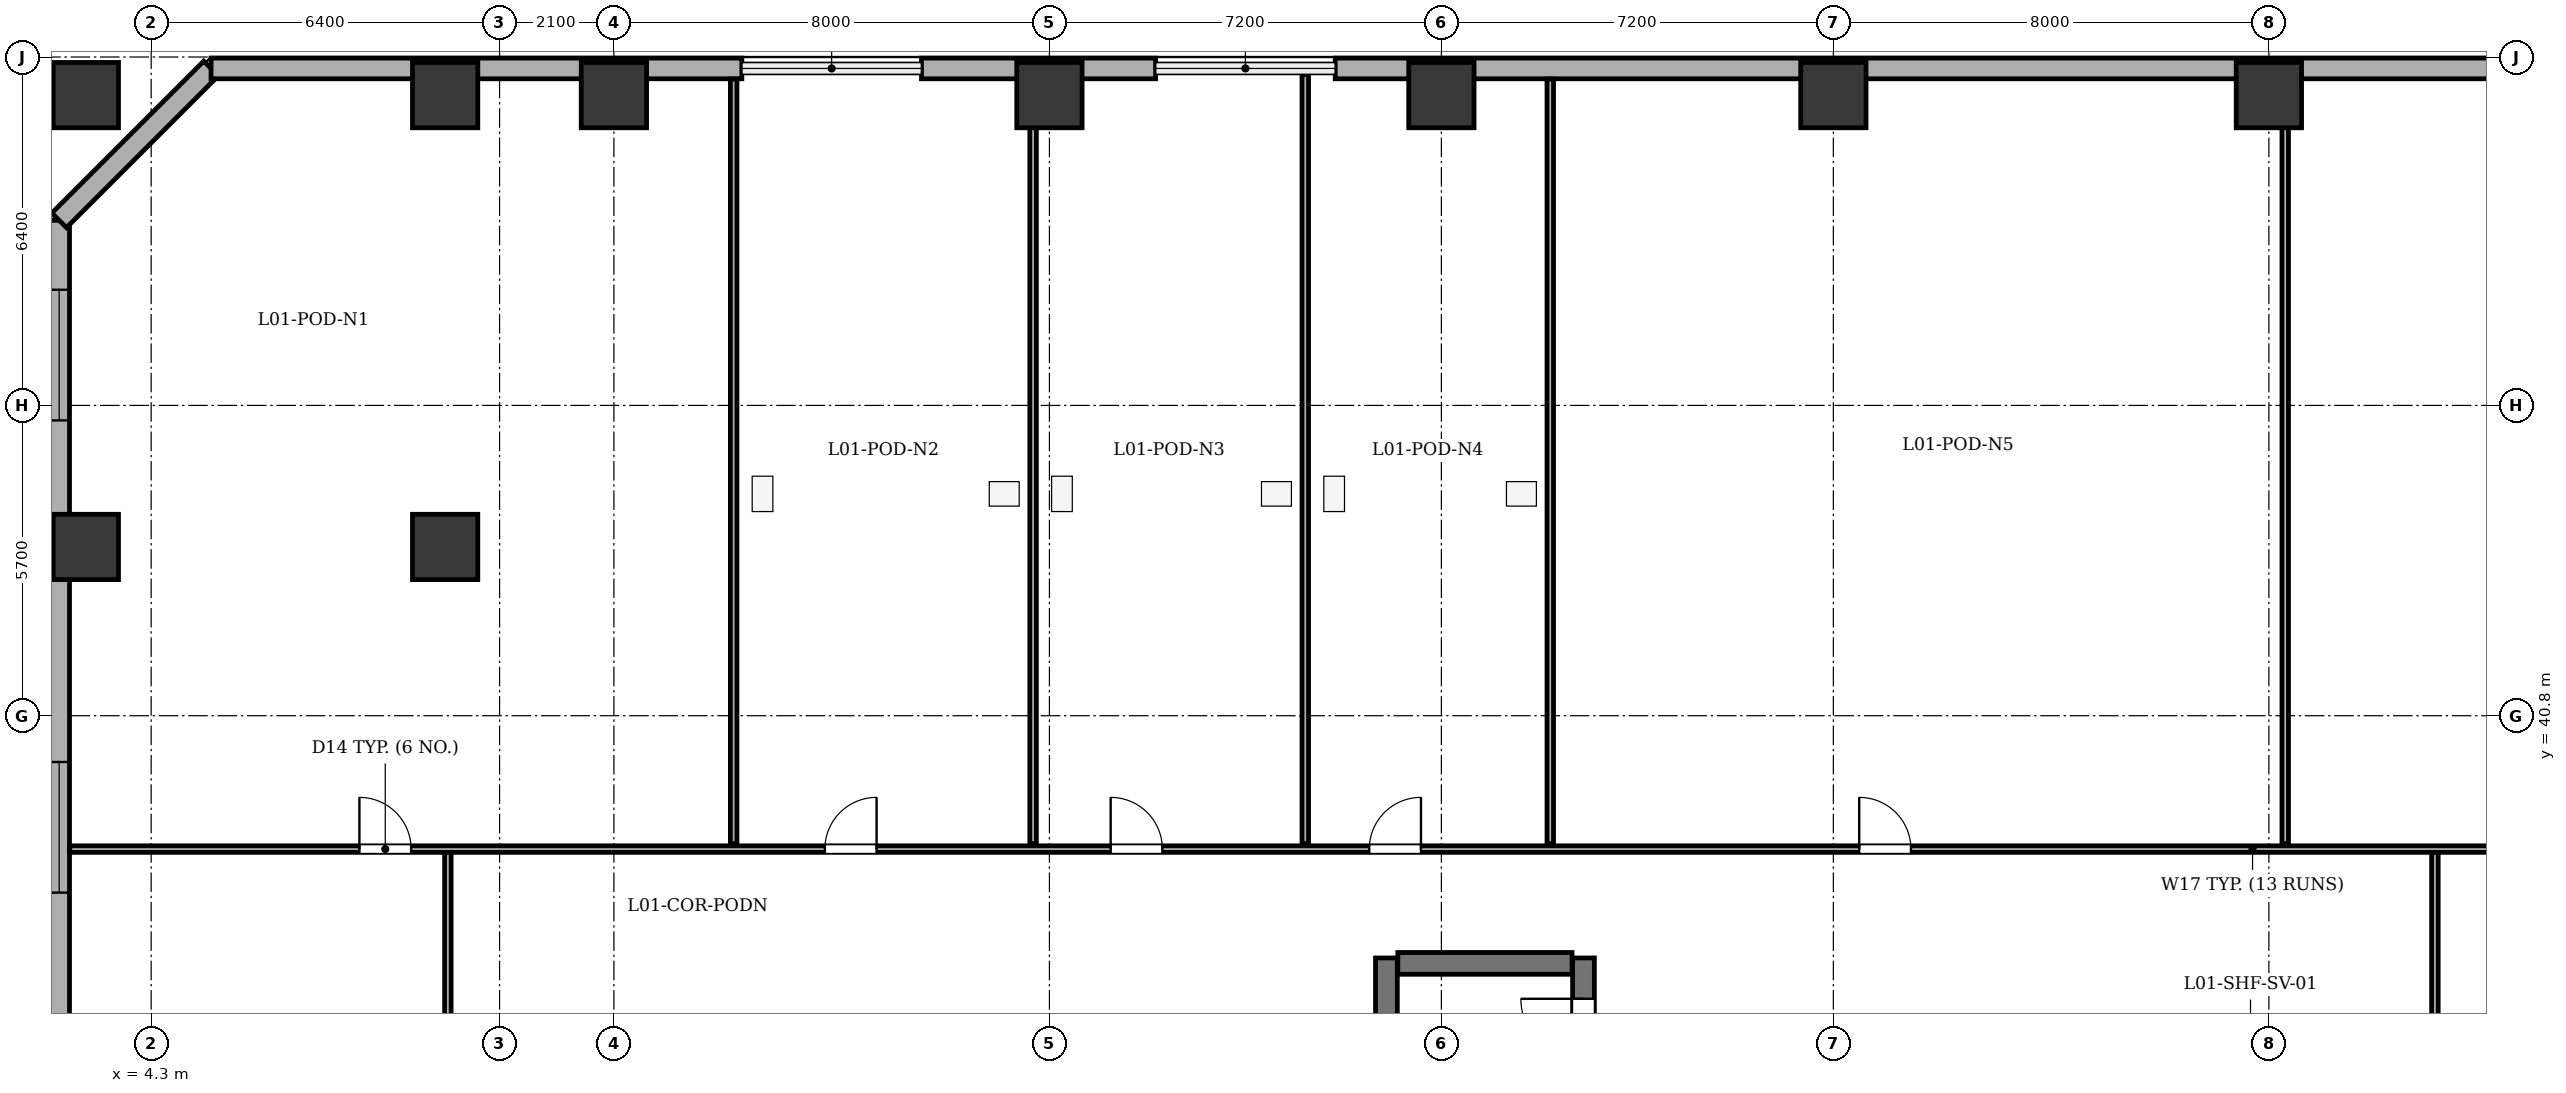
"""IFC4 building model, lengths in metres.
Left out: names, types, materials, properties, quantities, classifications, styles, units other than length and angle.
Written with IfcOpenShell. Run it as: python <this file> out.ifc"""

import sys

from ifc_helpers import new_model, si_unit, direction, frame, frame_2d, origin, origin_2d, place, context, subcontext, project, spatial, rectangle, extrude, element, fill, save


model = new_model("IFC4")
c1 = context("Model", 3, precision=1e-05, world=origin(), true_north=direction((0.0, 1.0)))
c2 = subcontext(c1, "Body", "Model", "MODEL_VIEW")
j1 = project(units=[si_unit("LENGTHUNIT", "METRE"), si_unit("PLANEANGLEUNIT", "RADIAN")], contexts=[c1])
p1 = place(None, origin())
s1 = spatial("IfcSite", under=j1, at=p1, CompositionType="ELEMENT")
p2 = place(p1, origin())
s2 = spatial("IfcBuilding", under=s1, at=p2, CompositionType="ELEMENT")
p3 = place(p2, frame((0.0, 0.0, 5.4)))
s3 = spatial("IfcBuildingStorey", under=s2, at=p3, CompositionType="ELEMENT", Elevation=5.4)
for number, where, z_axis, x_axis in (
    (1, (3.1, 52.2, 0.0), (0.0, 0.0, 1.0), (1.0, 0.0, 0.0)),
    (2, (9.7, 52.2, 0.0), (0.0, 0.0, 1.0), (1.0, 0.0, 0.0)),
    (3, (12.8, 52.2, 0.0), (0.0, 0.0, 1.0), (1.0, 0.0, 0.0)),
    (4, (20.8, 52.2, 0.0), (0.0, 0.0, 1.0), (1.0, 0.0, 0.0)),
    (5, (28.0, 52.2, 0.0), (0.0, 0.0, 1.0), (1.0, 0.0, 0.0)),
    (6, (35.2, 52.2, 0.0), (0.0, 0.0, 1.0), (1.0, 0.0, 0.0)),
    (7, (43.2, 52.2, 0.0), (0.0, 0.0, 1.0), (1.0, 0.0, 0.0)),
    (8, (3.1, 43.9, 0.0), (0.0, 0.0, 1.0), (1.0, 0.0, 0.0)),
    (9, (9.7, 43.9, 0.0), (0.0, 0.0, 1.0), (1.0, 0.0, 0.0)),
):
    element("IfcColumn", number, at=place(p3, frame(where, z_axis=z_axis, x_axis=x_axis)), inside=s3, PredefinedType="COLUMN", context=c2, shape_type="SweptSolid", body=[
        extrude(rectangle(XDim=1.2, YDim=1.2, at=origin_2d()), origin(), (0.0, 0.0, 1.0), 4.5),
    ])
p4 = place(p3, frame((2.61, 4.5, 0.0), z_axis=(0.0, 0.0, 1.0), x_axis=(0.0, 1.0, 0.0)))
e10 = element("IfcWall", 10, at=p4, inside=s3, PredefinedType="STANDARD", context=c2, shape_type="SweptSolid", body=[
    extrude(rectangle(XDim=45.4, YDim=0.38, at=frame_2d((22.7, 0.0))), origin(), (0.0, 0.0, 1.0), 4.18),
])
p5 = place(p4, frame((1.275, 0.0, 0.75)))
e11 = element("IfcOpeningElement", 11, at=p5, cuts=e10, PredefinedType="OPENING", context=c2, shape_type="SweptSolid", body=[
    extrude(rectangle(XDim=2.4, YDim=2.1, at=frame_2d((1.2, 1.05))), frame((0.0, 0.2, 0.0), z_axis=(0.0, -1.0, 0.0), x_axis=(1.0, 0.0, 0.0)), (0.0, 0.0, 1.0), 0.4),
])
p6 = place(p4, frame((9.95, 0.0, 0.75)))
e12 = element("IfcOpeningElement", 12, at=p6, cuts=e10, PredefinedType="OPENING", context=c2, shape_type="SweptSolid", body=[
    extrude(rectangle(XDim=2.4, YDim=2.1, at=frame_2d((1.2, 1.05))), frame((0.0, 0.2, 0.0), z_axis=(0.0, -1.0, 0.0), x_axis=(1.0, 0.0, 0.0)), (0.0, 0.0, 1.0), 0.4),
])
p7 = place(p4, frame((18.3, 0.0, 0.75)))
e13 = element("IfcOpeningElement", 13, at=p7, cuts=e10, PredefinedType="OPENING", context=c2, shape_type="SweptSolid", body=[
    extrude(rectangle(XDim=2.4, YDim=2.1, at=frame_2d((1.2, 1.05))), frame((0.0, 0.2, 0.0), z_axis=(0.0, -1.0, 0.0), x_axis=(1.0, 0.0, 0.0)), (0.0, 0.0, 1.0), 0.4),
])
p8 = place(p4, frame((24.7, 0.0, 0.75)))
e14 = element("IfcOpeningElement", 14, at=p8, cuts=e10, PredefinedType="OPENING", context=c2, shape_type="SweptSolid", body=[
    extrude(rectangle(XDim=2.4, YDim=2.1, at=frame_2d((1.2, 1.05))), frame((0.0, 0.2, 0.0), z_axis=(0.0, -1.0, 0.0), x_axis=(1.0, 0.0, 0.0)), (0.0, 0.0, 1.0), 0.4),
])
p9 = place(p4, frame((33.05, 0.0, 0.75)))
e15 = element("IfcOpeningElement", 15, at=p9, cuts=e10, PredefinedType="OPENING", context=c2, shape_type="SweptSolid", body=[
    extrude(rectangle(XDim=2.4, YDim=2.1, at=frame_2d((1.2, 1.05))), frame((0.0, 0.2, 0.0), z_axis=(0.0, -1.0, 0.0), x_axis=(1.0, 0.0, 0.0)), (0.0, 0.0, 1.0), 0.4),
])
p10 = place(p4, frame((41.725, 0.0, 0.75)))
e16 = element("IfcOpeningElement", 16, at=p10, cuts=e10, PredefinedType="OPENING", context=c2, shape_type="SweptSolid", body=[
    extrude(rectangle(XDim=2.4, YDim=2.1, at=frame_2d((1.2, 1.05))), frame((0.0, 0.2, 0.0), z_axis=(0.0, -1.0, 0.0), x_axis=(1.0, 0.0, 0.0)), (0.0, 0.0, 1.0), 0.4),
])
p11 = place(p3, frame((2.61, 49.9, 0.0), z_axis=(0.0, 0.0, 1.0), x_axis=(0.707075841688, 0.707137719332, 0.0)))
e17 = element("IfcWall", 17, at=p11, inside=s3, PredefinedType="STANDARD", context=c2, shape_type="SweptSolid", body=[
    extrude(rectangle(XDim=3.946, YDim=0.38, at=frame_2d((1.973, 0.0))), origin(), (0.0, 0.0, 1.0), 4.18),
])
p12 = place(p3, frame((5.4, 52.69, 0.0), z_axis=(0.0, 0.0, 1.0), x_axis=(1.0, 0.0, 0.0)))
e18 = element("IfcWall", 18, at=p12, inside=s3, PredefinedType="STANDARD", context=c2, shape_type="SweptSolid", body=[
    extrude(rectangle(XDim=9.75, YDim=0.38, at=frame_2d((4.875, 0.0))), origin(), (0.0, 0.0, 1.0), 4.18),
])
p13 = place(p3, frame((18.45, 52.69, 0.0), z_axis=(0.0, 0.0, 1.0), x_axis=(1.0, 0.0, 0.0)))
e19 = element("IfcWall", 19, at=p13, inside=s3, PredefinedType="STANDARD", context=c2, shape_type="SweptSolid", body=[
    extrude(rectangle(XDim=4.3, YDim=0.38, at=frame_2d((2.15, 0.0))), origin(), (0.0, 0.0, 1.0), 4.18),
])
p14 = place(p3, frame((26.05, 52.69, 0.0), z_axis=(0.0, 0.0, 1.0), x_axis=(1.0, 0.0, 0.0)))
e20 = element("IfcWall", 20, at=p14, inside=s3, PredefinedType="STANDARD", context=c2, shape_type="SweptSolid", body=[
    extrude(rectangle(XDim=28.95, YDim=0.38, at=frame_2d((14.475, 0.0))), origin(), (0.0, 0.0, 1.0), 4.18),
])
p15 = place(p3, frame((26.99, 28.75, 0.0), z_axis=(0.0, 0.0, 1.0), x_axis=(0.0, 1.0, 0.0)))
e21 = element("IfcWall", 21, at=p15, inside=s3, PredefinedType="SHEAR", context=c2, shape_type="SweptSolid", body=[
    extrude(rectangle(XDim=7.6, YDim=0.4, at=frame_2d((3.8, 0.0))), origin(), (0.0, 0.0, 1.0), 4.18),
])
p16 = place(p3, frame((30.61, 28.75, 0.0), z_axis=(0.0, 0.0, 1.0), x_axis=(0.0, 1.0, 0.0)))
e22 = element("IfcWall", 22, at=p16, inside=s3, PredefinedType="SHEAR", context=c2, shape_type="SweptSolid", body=[
    extrude(rectangle(XDim=7.6, YDim=0.4, at=frame_2d((3.8, 0.0))), origin(), (0.0, 0.0, 1.0), 4.18),
])
p17 = place(p16, frame((5.7, 0.0, 0.0)))
e23 = element("IfcOpeningElement", 23, at=p17, cuts=e22, PredefinedType="OPENING", context=c2, shape_type="SweptSolid", body=[
    extrude(rectangle(XDim=1.15, YDim=2.15, at=frame_2d((0.575, 1.075))), frame((0.0, 0.21, 0.0), z_axis=(0.0, -1.0, 0.0), x_axis=(1.0, 0.0, 0.0)), (0.0, 0.0, 1.0), 0.42),
])
p18 = place(p3, frame((27.2, 36.25, 0.0), z_axis=(0.0, 0.0, 1.0), x_axis=(1.0, 0.0, 0.0)))
e24 = element("IfcWall", 24, at=p18, inside=s3, PredefinedType="SHEAR", context=c2, shape_type="SweptSolid", body=[
    extrude(rectangle(XDim=3.2, YDim=0.4, at=frame_2d((1.6, 0.0))), origin(), (0.0, 0.0, 1.0), 4.18),
])
p19 = place(p3, frame((2.805, 38.35, 0.0), z_axis=(0.0, 0.0, 1.0), x_axis=(1.0, 0.0, 0.0)))
e25 = element("IfcWall", 25, at=p19, inside=s3, PredefinedType="PARTITIONING", context=c2, shape_type="SweptSolid", body=[
    extrude(rectangle(XDim=54.79, YDim=0.12, at=frame_2d((27.395, 0.0))), origin(), (0.0, 0.0, 1.0), 4.18),
])
p20 = place(p19, frame((5.32, 0.0, 0.0)))
e26 = element("IfcOpeningElement", 26, at=p20, cuts=e25, PredefinedType="OPENING", context=c2, shape_type="SweptSolid", body=[
    extrude(rectangle(XDim=0.95, YDim=2.1, at=frame_2d((0.475, 1.05))), frame((0.0, 0.07, 0.0), z_axis=(0.0, -1.0, 0.0), x_axis=(1.0, 0.0, 0.0)), (0.0, 0.0, 1.0), 0.14),
])
p21 = place(p19, frame((13.87, 0.0, 0.0)))
e27 = element("IfcOpeningElement", 27, at=p21, cuts=e25, PredefinedType="OPENING", context=c2, shape_type="SweptSolid", body=[
    extrude(rectangle(XDim=0.95, YDim=2.1, at=frame_2d((0.475, 1.05))), frame((0.0, 0.07, 0.0), z_axis=(0.0, -1.0, 0.0), x_axis=(1.0, 0.0, 0.0)), (0.0, 0.0, 1.0), 0.14),
])
p22 = place(p19, frame((19.12, 0.0, 0.0)))
e28 = element("IfcOpeningElement", 28, at=p22, cuts=e25, PredefinedType="OPENING", context=c2, shape_type="SweptSolid", body=[
    extrude(rectangle(XDim=0.95, YDim=2.1, at=frame_2d((0.475, 1.05))), frame((0.0, 0.07, 0.0), z_axis=(0.0, -1.0, 0.0), x_axis=(1.0, 0.0, 0.0)), (0.0, 0.0, 1.0), 0.14),
])
p23 = place(p19, frame((23.87, 0.0, 0.0)))
e29 = element("IfcOpeningElement", 29, at=p23, cuts=e25, PredefinedType="OPENING", context=c2, shape_type="SweptSolid", body=[
    extrude(rectangle(XDim=0.95, YDim=2.1, at=frame_2d((0.475, 1.05))), frame((0.0, 0.07, 0.0), z_axis=(0.0, -1.0, 0.0), x_axis=(1.0, 0.0, 0.0)), (0.0, 0.0, 1.0), 0.14),
])
p24 = place(p19, frame((32.87, 0.0, 0.0)))
e30 = element("IfcOpeningElement", 30, at=p24, cuts=e25, PredefinedType="OPENING", context=c2, shape_type="SweptSolid", body=[
    extrude(rectangle(XDim=0.95, YDim=2.1, at=frame_2d((0.475, 1.05))), frame((0.0, 0.07, 0.0), z_axis=(0.0, -1.0, 0.0), x_axis=(1.0, 0.0, 0.0)), (0.0, 0.0, 1.0), 0.14),
])
p25 = place(p19, frame((46.37, 0.0, 0.0)))
e31 = element("IfcOpeningElement", 31, at=p25, cuts=e25, PredefinedType="OPENING", context=c2, shape_type="SweptSolid", body=[
    extrude(rectangle(XDim=0.95, YDim=2.1, at=frame_2d((0.475, 1.05))), frame((0.0, 0.07, 0.0), z_axis=(0.0, -1.0, 0.0), x_axis=(1.0, 0.0, 0.0)), (0.0, 0.0, 1.0), 0.14),
])
p26 = place(p3, frame((15.0, 38.45, 0.0), z_axis=(0.0, 0.0, 1.0), x_axis=(0.0, 1.0, 0.0)))
e32 = element("IfcWall", 32, at=p26, inside=s3, PredefinedType="PARTITIONING", context=c2, shape_type="SweptSolid", body=[
    extrude(rectangle(XDim=14.045, YDim=0.12, at=frame_2d((7.022, 0.0))), origin(), (0.0, 0.0, 1.0), 4.18),
])
p27 = place(p3, frame((20.5, 38.45, 0.0), z_axis=(0.0, 0.0, 1.0), x_axis=(0.0, 1.0, 0.0)))
e33 = element("IfcWall", 33, at=p27, inside=s3, PredefinedType="PARTITIONING", context=c2, shape_type="SweptSolid", body=[
    extrude(rectangle(XDim=14.045, YDim=0.12, at=frame_2d((7.022, 0.0))), origin(), (0.0, 0.0, 1.0), 3.065),
])
p28 = place(p3, frame((25.5, 38.45, 0.0), z_axis=(0.0, 0.0, 1.0), x_axis=(0.0, 1.0, 0.0)))
e34 = element("IfcWall", 34, at=p28, inside=s3, PredefinedType="PARTITIONING", context=c2, shape_type="SweptSolid", body=[
    extrude(rectangle(XDim=14.125, YDim=0.12, at=frame_2d((7.062, 0.0))), origin(), (0.0, 0.0, 1.0), 4.18),
])
p29 = place(p3, frame((30.0, 38.45, 0.0), z_axis=(0.0, 0.0, 1.0), x_axis=(0.0, 1.0, 0.0)))
e35 = element("IfcWall", 35, at=p29, inside=s3, PredefinedType="PARTITIONING", context=c2, shape_type="SweptSolid", body=[
    extrude(rectangle(XDim=14.045, YDim=0.12, at=frame_2d((7.022, 0.0))), origin(), (0.0, 0.0, 1.0), 4.18),
])
p30 = place(p3, frame((43.5, 38.45, 0.0), z_axis=(0.0, 0.0, 1.0), x_axis=(0.0, 1.0, 0.0)))
e36 = element("IfcWall", 36, at=p30, inside=s3, PredefinedType="PARTITIONING", context=c2, shape_type="SweptSolid", body=[
    extrude(rectangle(XDim=14.045, YDim=0.12, at=frame_2d((7.022, 0.0))), origin(), (0.0, 0.0, 1.0), 3.065),
])
p31 = place(p3, frame((9.75, 18.565, 0.0), z_axis=(0.0, 0.0, 1.0), x_axis=(0.0, 1.0, 0.0)))
e37 = element("IfcWall", 37, at=p31, inside=s3, PredefinedType="PARTITIONING", context=c2, shape_type="SweptSolid", body=[
    extrude(rectangle(XDim=19.72, YDim=0.12, at=frame_2d((9.86, 0.0))), origin(), (0.0, 0.0, 1.0), 3.065),
])
p32 = place(p31, frame((7.985, 0.0, 0.0)))
e38 = element("IfcOpeningElement", 38, at=p32, cuts=e37, PredefinedType="OPENING", context=c2, shape_type="SweptSolid", body=[
    extrude(rectangle(XDim=1.0, YDim=2.1, at=frame_2d((0.5, 1.05))), frame((0.0, 0.07, 0.0), z_axis=(0.0, -1.0, 0.0), x_axis=(1.0, 0.0, 0.0)), (0.0, 0.0, 1.0), 0.14),
])
p33 = place(p3, frame((46.25, 18.565, 0.0), z_axis=(0.0, 0.0, 1.0), x_axis=(0.0, 1.0, 0.0)))
e39 = element("IfcWall", 39, at=p33, inside=s3, PredefinedType="PARTITIONING", context=c2, shape_type="SweptSolid", body=[
    extrude(rectangle(XDim=19.72, YDim=0.12, at=frame_2d((9.86, 0.0))), origin(), (0.0, 0.0, 1.0), 4.18),
])
p34 = place(p33, frame((7.985, 0.0, 0.0)))
e40 = element("IfcOpeningElement", 40, at=p34, cuts=e39, PredefinedType="OPENING", context=c2, shape_type="SweptSolid", body=[
    extrude(rectangle(XDim=1.0, YDim=2.1, at=frame_2d((0.5, 1.05))), frame((0.0, 0.07, 0.0), z_axis=(0.0, -1.0, 0.0), x_axis=(1.0, 0.0, 0.0)), (0.0, 0.0, 1.0), 0.14),
])
p35 = place(p9, origin())
e41 = element("IfcWindow", 41, at=p35, inside=s3, PartitioningType="SINGLE_PANEL", PredefinedType="WINDOW", context=c2, shape_type="SweptSolid", body=[
    extrude(rectangle(XDim=2.4, YDim=2.1, at=frame_2d((1.2, 1.05))), frame((0.0, 0.03, 0.0), z_axis=(0.0, -1.0, 0.0), x_axis=(1.0, 0.0, 0.0)), (0.0, 0.0, 1.0), 0.06),
])
fill(e15, e41)
p36 = place(p10, origin())
e42 = element("IfcWindow", 42, at=p36, inside=s3, PartitioningType="SINGLE_PANEL", PredefinedType="WINDOW", context=c2, shape_type="SweptSolid", body=[
    extrude(rectangle(XDim=2.4, YDim=2.1, at=frame_2d((1.2, 1.05))), frame((0.0, 0.03, 0.0), z_axis=(0.0, -1.0, 0.0), x_axis=(1.0, 0.0, 0.0)), (0.0, 0.0, 1.0), 0.06),
])
fill(e16, e42)
p37 = place(p17, origin())
e43 = element("IfcDoor", 43, at=p37, inside=s3, OperationType="SINGLE_SWING_RIGHT", PredefinedType="DOOR", context=c2, shape_type="SweptSolid", body=[
    extrude(rectangle(XDim=1.15, YDim=2.15, at=frame_2d((0.575, 1.075))), frame((0.0, 0.025, 0.0), z_axis=(0.0, -1.0, 0.0), x_axis=(1.0, 0.0, 0.0)), (0.0, 0.0, 1.0), 0.05),
])
fill(e23, e43)
p38 = place(p20, origin())
e44 = element("IfcDoor", 44, at=p38, inside=s3, OperationType="SINGLE_SWING_LEFT", PredefinedType="DOOR", context=c2, shape_type="SweptSolid", body=[
    extrude(rectangle(XDim=0.95, YDim=2.1, at=frame_2d((0.475, 1.05))), frame((0.0, 0.025, 0.0), z_axis=(0.0, -1.0, 0.0), x_axis=(1.0, 0.0, 0.0)), (0.0, 0.0, 1.0), 0.05),
])
fill(e26, e44)
p39 = place(p21, origin())
e45 = element("IfcDoor", 45, at=p39, inside=s3, OperationType="SINGLE_SWING_RIGHT", PredefinedType="DOOR", context=c2, shape_type="SweptSolid", body=[
    extrude(rectangle(XDim=0.95, YDim=2.1, at=frame_2d((0.475, 1.05))), frame((0.0, 0.025, 0.0), z_axis=(0.0, -1.0, 0.0), x_axis=(1.0, 0.0, 0.0)), (0.0, 0.0, 1.0), 0.05),
])
fill(e27, e45)
p40 = place(p22, origin())
e46 = element("IfcDoor", 46, at=p40, inside=s3, OperationType="SINGLE_SWING_LEFT", PredefinedType="DOOR", context=c2, shape_type="SweptSolid", body=[
    extrude(rectangle(XDim=0.95, YDim=2.1, at=frame_2d((0.475, 1.05))), frame((0.0, 0.025, 0.0), z_axis=(0.0, -1.0, 0.0), x_axis=(1.0, 0.0, 0.0)), (0.0, 0.0, 1.0), 0.05),
])
fill(e28, e46)
p41 = place(p23, origin())
e47 = element("IfcDoor", 47, at=p41, inside=s3, OperationType="SINGLE_SWING_RIGHT", PredefinedType="DOOR", context=c2, shape_type="SweptSolid", body=[
    extrude(rectangle(XDim=0.95, YDim=2.1, at=frame_2d((0.475, 1.05))), frame((0.0, 0.025, 0.0), z_axis=(0.0, -1.0, 0.0), x_axis=(1.0, 0.0, 0.0)), (0.0, 0.0, 1.0), 0.05),
])
fill(e29, e47)
p42 = place(p24, origin())
e48 = element("IfcDoor", 48, at=p42, inside=s3, OperationType="SINGLE_SWING_LEFT", PredefinedType="DOOR", context=c2, shape_type="SweptSolid", body=[
    extrude(rectangle(XDim=0.95, YDim=2.1, at=frame_2d((0.475, 1.05))), frame((0.0, 0.025, 0.0), z_axis=(0.0, -1.0, 0.0), x_axis=(1.0, 0.0, 0.0)), (0.0, 0.0, 1.0), 0.05),
])
fill(e30, e48)
save(model, sys.argv[1])
